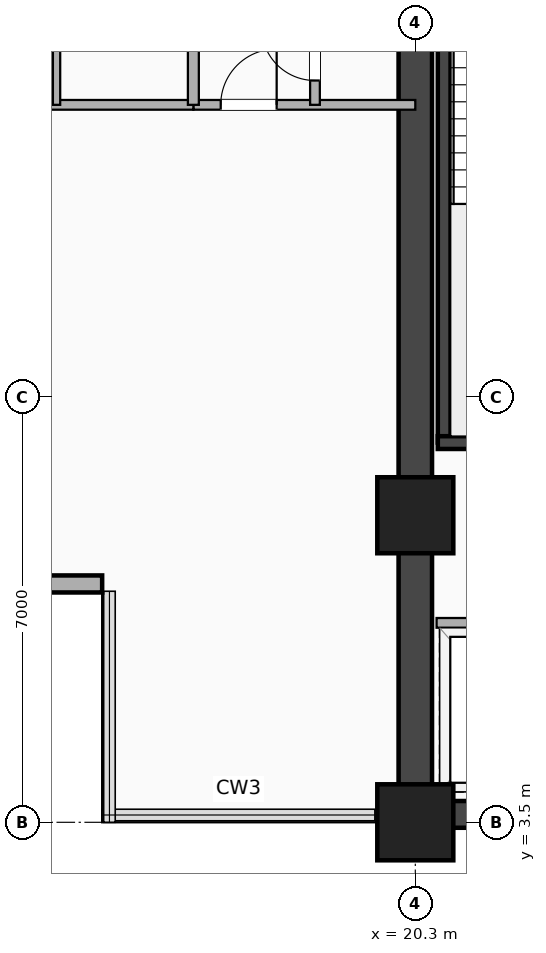
"""IFC4 building model, lengths in metres.
Left out: names, types, materials, properties, quantities, classifications, styles, units other than length and angle.
Written with IfcOpenShell. Run it as: python <this file> out.ifc"""

import sys

from ifc_helpers import new_model, si_unit, direction, frame, frame_2d, origin, origin_2d, place, context, subcontext, project, spatial, rectangle, extrude, element, fill, save


model = new_model("IFC4")
c1 = context("Model", 3, precision=1e-05, world=origin(), true_north=direction((0.0, 1.0)))
c2 = subcontext(c1, "Body", "Model", "MODEL_VIEW")
j1 = project(units=[si_unit("LENGTHUNIT", "METRE"), si_unit("PLANEANGLEUNIT", "RADIAN")], contexts=[c1])
p1 = place(None, origin())
s1 = spatial("IfcSite", under=j1, at=p1, CompositionType="ELEMENT")
p2 = place(p1, origin())
s2 = spatial("IfcBuilding", under=s1, at=p2, CompositionType="ELEMENT")
p3 = place(p2, frame((0.0, 0.0, 91.7)))
s3 = spatial("IfcBuildingStorey", under=s2, at=p3, CompositionType="ELEMENT", Elevation=91.7)
p4 = place(p3, frame((20.3, 3.63, 0.0), z_axis=(0.0, 0.0, 1.0), x_axis=(1.0, 0.0, 0.0)))
e1 = element("IfcWall", 1, at=p4, inside=s3, PredefinedType="SHEAR", context=c2, shape_type="SweptSolid", body=[
    extrude(rectangle(XDim=24.5, YDim=0.44, at=frame_2d((12.25, 0.0))), origin(), (0.0, 0.0, 1.0), 3.24),
])
p5 = place(p3, frame((20.3, 3.5, 0.0), z_axis=(0.0, 0.0, 1.0), x_axis=(0.0, 1.0, 0.0)))
e2 = element("IfcWall", 2, at=p5, inside=s3, PredefinedType="SHEAR", context=c2, shape_type="SweptSolid", body=[
    extrude(rectangle(XDim=16.9, YDim=0.55, at=frame_2d((8.45, 0.0))), origin(), (0.0, 0.0, 1.0), 3.24),
])
p6 = place(p3, frame((20.775, 9.745, 0.0), z_axis=(0.0, 0.0, 1.0), x_axis=(0.0, 1.0, 0.0)))
e3 = element("IfcWall", 3, at=p6, inside=s3, PredefinedType="SHEAR", context=c2, shape_type="SweptSolid", body=[
    extrude(rectangle(XDim=8.01, YDim=0.21, at=frame_2d((4.005, 0.0))), origin(), (0.0, 0.0, 1.0), 3.24),
])
p7 = place(p3, frame((20.67, 9.745, 0.0), z_axis=(0.0, 0.0, 1.0), x_axis=(1.0, 0.0, 0.0)))
e4 = element("IfcWall", 4, at=p7, inside=s3, PredefinedType="SHEAR", context=c2, shape_type="SweptSolid", body=[
    extrude(rectangle(XDim=3.66, YDim=0.21, at=frame_2d((1.83, 0.0))), origin(), (0.0, 0.0, 1.0), 3.24),
])
for number, where, z_axis, x_axis in (
    (5, (20.3, 3.5, -0.26), (0.0, 0.0, 1.0), (1.0, 0.0, 0.0)),
    (6, (20.3, 8.55, -0.26), (0.0, 0.0, 1.0), (1.0, 0.0, 0.0)),
):
    element("IfcColumn", number, at=place(p3, frame(where, z_axis=z_axis, x_axis=x_axis)), inside=s3, PredefinedType="COLUMN", context=c2, shape_type="SweptSolid", body=[
        extrude(rectangle(XDim=1.25, YDim=1.25, at=origin_2d()), origin(), (0.0, 0.0, 1.0), 3.5),
    ])
p8 = place(p3, frame((11.35, 7.42, 0.0), z_axis=(0.0, 0.0, 1.0), x_axis=(1.0, 0.0, 0.0)))
e7 = element("IfcWall", 7, at=p8, inside=s3, PredefinedType="SOLIDWALL", context=c2, shape_type="SweptSolid", body=[
    extrude(rectangle(XDim=3.8, YDim=0.28, at=frame_2d((1.9, 0.0))), origin(), (0.0, 0.0, 1.0), 3.24),
])
p9 = place(p8, frame((1.025, 0.0, 0.85)))
e8 = element("IfcOpeningElement", 8, at=p9, cuts=e7, PredefinedType="OPENING", context=c2, shape_type="SweptSolid", body=[
    extrude(rectangle(XDim=1.75, YDim=1.65, at=frame_2d((0.875, 0.825))), frame((0.0, 0.15, 0.0), z_axis=(0.0, -1.0, 0.0), x_axis=(1.0, 0.0, 0.0)), (0.0, 0.0, 1.0), 0.3),
])
p10 = place(p3, frame((20.65, 6.78, 0.0), z_axis=(0.0, 0.0, 1.0), x_axis=(1.0, 0.0, 0.0)))
e9 = element("IfcWall", 9, at=p10, inside=s3, PredefinedType="PARTITIONING", context=c2, shape_type="SweptSolid", body=[
    extrude(rectangle(XDim=8.3, YDim=0.16, at=frame_2d((4.15, 0.0))), origin(), (0.0, 0.0, 1.0), 2.313),
])
p11 = place(p10, frame((3.695, 0.0, 0.0)))
e10 = element("IfcOpeningElement", 10, at=p11, cuts=e9, PredefinedType="OPENING", context=c2, shape_type="SweptSolid", body=[
    extrude(rectangle(XDim=1.15, YDim=2.2, at=frame_2d((0.575, 1.1))), frame((0.0, 0.09, 0.0), z_axis=(0.0, -1.0, 0.0), x_axis=(1.0, 0.0, 0.0)), (0.0, 0.0, 1.0), 0.18),
])
p12 = place(p10, frame((5.492, 0.0, 0.0)))
e11 = element("IfcOpeningElement", 11, at=p12, cuts=e9, PredefinedType="OPENING", context=c2, shape_type="SweptSolid", body=[
    extrude(rectangle(XDim=1.15, YDim=2.2, at=frame_2d((0.575, 1.1))), frame((0.0, 0.09, 0.0), z_axis=(0.0, -1.0, 0.0), x_axis=(1.0, 0.0, 0.0)), (0.0, 0.0, 1.0), 0.18),
])
p13 = place(p10, frame((1.059, 0.0, 0.0)))
e12 = element("IfcOpeningElement", 12, at=p13, cuts=e9, PredefinedType="OPENING", context=c2, shape_type="SweptSolid", body=[
    extrude(rectangle(XDim=1.15, YDim=2.2, at=frame_2d((0.575, 1.1))), frame((0.0, 0.09, 0.0), z_axis=(0.0, -1.0, 0.0), x_axis=(1.0, 0.0, 0.0)), (0.0, 0.0, 1.0), 0.18),
])
p14 = place(p3, frame((16.65, 15.3, 0.0), z_axis=(0.0, 0.0, 1.0), x_axis=(1.0, 0.0, 0.0)))
e13 = element("IfcWall", 13, at=p14, inside=s3, PredefinedType="PARTITIONING", context=c2, shape_type="SweptSolid", body=[
    extrude(rectangle(XDim=3.65, YDim=0.16, at=frame_2d((1.825, 0.0))), origin(), (0.0, 0.0, 1.0), 2.313),
])
p15 = place(p14, frame((1.37, 0.0, 0.0), z_axis=(0.0, 0.0, 1.0), x_axis=(-1.0, 0.0, 0.0)))
e14 = element("IfcOpeningElement", 14, at=p15, cuts=e13, PredefinedType="OPENING", context=c2, shape_type="SweptSolid", body=[
    extrude(rectangle(XDim=0.92, YDim=2.08, at=frame_2d((0.46, 1.04))), frame((0.0, 0.09, 0.0), z_axis=(0.0, -1.0, 0.0), x_axis=(1.0, 0.0, 0.0)), (0.0, 0.0, 1.0), 0.18),
])
p16 = place(p3, frame((18.65, 15.3, 0.0), z_axis=(0.0, 0.0, 1.0), x_axis=(0.0, 1.0, 0.0)))
e15 = element("IfcWall", 15, at=p16, inside=s3, PredefinedType="PARTITIONING", context=c2, shape_type="SweptSolid", body=[
    extrude(rectangle(XDim=5.12, YDim=0.16, at=frame_2d((2.56, 0.0))), origin(), (0.0, 0.0, 1.0), 2.313),
])
p17 = place(p16, frame((1.28, 0.0, 0.0), z_axis=(0.0, 0.0, 1.0), x_axis=(-1.0, 0.0, 0.0)))
e16 = element("IfcOpeningElement", 16, at=p17, cuts=e15, PredefinedType="OPENING", context=c2, shape_type="SweptSolid", body=[
    extrude(rectangle(XDim=0.88, YDim=2.08, at=frame_2d((0.44, 1.04))), frame((0.0, 0.09, 0.0), z_axis=(0.0, -1.0, 0.0), x_axis=(1.0, 0.0, 0.0)), (0.0, 0.0, 1.0), 0.18),
])
p18 = place(p3, frame((11.47, 15.3, 0.0), z_axis=(0.0, 0.0, 1.0), x_axis=(1.0, 0.0, 0.0)))
e17 = element("IfcWall", 17, at=p18, inside=s3, PredefinedType="PARTITIONING", context=c2, shape_type="SweptSolid", body=[
    extrude(rectangle(XDim=5.18, YDim=0.16, at=frame_2d((2.59, 0.0))), origin(), (0.0, 0.0, 1.0), 2.603),
])
p19 = place(p3, frame((14.4, 15.3, 0.0), z_axis=(0.0, 0.0, 1.0), x_axis=(0.0, 1.0, 0.0)))
e18 = element("IfcWall", 18, at=p19, inside=s3, PredefinedType="PARTITIONING", context=c2, shape_type="SweptSolid", body=[
    extrude(rectangle(XDim=2.12, YDim=0.12, at=frame_2d((1.06, 0.0))), origin(), (0.0, 0.0, 1.0), 2.922),
])
p20 = place(p3, frame((16.65, 15.3, 0.0), z_axis=(0.0, 0.0, 1.0), x_axis=(0.0, 1.0, 0.0)))
e19 = element("IfcWall", 19, at=p20, inside=s3, PredefinedType="PARTITIONING", context=c2, shape_type="SweptSolid", body=[
    extrude(rectangle(XDim=2.12, YDim=0.18, at=frame_2d((1.06, 0.0))), origin(), (0.0, 0.0, 1.0), 2.922),
])
p21 = place(p15, origin())
e20 = element("IfcDoor", 20, at=p21, inside=s3, OperationType="SINGLE_SWING_RIGHT", PredefinedType="DOOR", context=c2, shape_type="SweptSolid", body=[
    extrude(rectangle(XDim=0.92, YDim=2.08, at=frame_2d((0.46, 1.04))), frame((0.0, 0.025, 0.0), z_axis=(0.0, -1.0, 0.0), x_axis=(1.0, 0.0, 0.0)), (0.0, 0.0, 1.0), 0.05),
])
fill(e14, e20)
p22 = place(p17, origin())
e21 = element("IfcDoor", 21, at=p22, inside=s3, OperationType="SINGLE_SWING_RIGHT", PredefinedType="DOOR", context=c2, shape_type="SweptSolid", body=[
    extrude(rectangle(XDim=0.88, YDim=2.08, at=frame_2d((0.44, 1.04))), frame((0.0, 0.025, 0.0), z_axis=(0.0, -1.0, 0.0), x_axis=(1.0, 0.0, 0.0)), (0.0, 0.0, 1.0), 0.05),
])
fill(e16, e21)
save(model, sys.argv[1])
